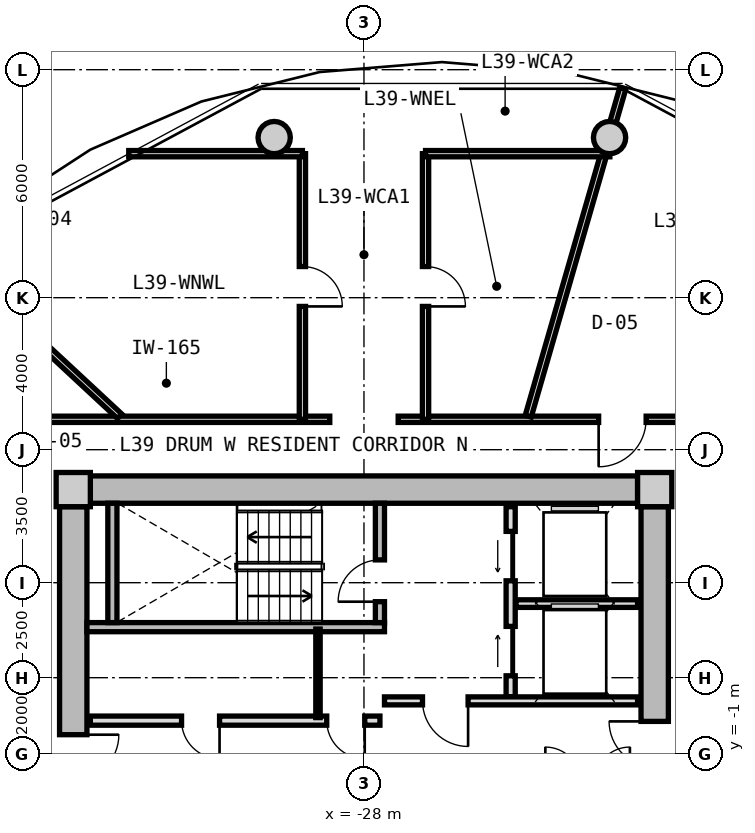
"""IFC4 building model, lengths in metres.
Left out: names, types, materials, properties, quantities, classifications, styles, units other than length and angle.
Written with IfcOpenShell. Run it as: python <this file> out.ifc"""

import sys

from ifc_helpers import new_model, si_unit, direction, frame, frame_2d, origin, origin_2d, place, context, subcontext, project, spatial, rectangle, circle, extrude, source, transform, mapped, element, fill, save


model = new_model("IFC4")
c1 = context("Model", 3, precision=1e-05, world=origin(), true_north=direction((0.0, 1.0)))
c2 = subcontext(c1, "Body", "Model", "MODEL_VIEW")
j1 = project(units=[si_unit("LENGTHUNIT", "METRE"), si_unit("PLANEANGLEUNIT", "RADIAN")], contexts=[c1])
p1 = place(None, origin())
s1 = spatial("IfcSite", under=j1, at=p1, CompositionType="ELEMENT")
p2 = place(p1, origin())
s2 = spatial("IfcBuilding", under=s1, at=p2, CompositionType="ELEMENT")
p3 = place(p2, frame((0.0, 0.0, 126.75)))
s3 = spatial("IfcBuildingStorey", under=s2, at=p3, CompositionType="ELEMENT", Elevation=126.75)
m1 = source(origin(), c2, "Body", "SweptSolid", [
    extrude(rectangle(XDim=0.9, YDim=0.9, at=origin_2d()), origin(), (0.0, 0.0, 1.0), 3.05),
])
for number, where, z_axis, x_axis in (
    (1, (-20.35, 5.95, 0.0), (0.0, 0.0, 1.0), (1.0, 0.0, 0.0)),
    (2, (-35.65, 5.95, 0.0), (0.0, 0.0, 1.0), (1.0, 0.0, 0.0)),
):
    element("IfcColumn", number, at=place(p3, frame(where, z_axis=z_axis, x_axis=x_axis)), inside=s3, PredefinedType="COLUMN", context=c2, shape_type="MappedRepresentation", body=[
        mapped(m1, transform((0.0, 0.0, 0.0), x_axis=(1.0, 0.0, 0.0), y_axis=(0.0, 1.0, 0.0), z_axis=(0.0, 0.0, 1.0), scale=1.0)),
    ])
m2 = source(origin(), c2, "Body", "SweptSolid", [
    extrude(rectangle(XDim=14.4, YDim=0.72, at=frame_2d((7.2, 0.0))), origin(), (0.0, 0.0, 1.0), 2.73),
])
p4 = place(p3, frame((-35.2, 5.95, 0.0), z_axis=(0.0, 0.0, 1.0), x_axis=(1.0, 0.0, 0.0)))
e3 = element("IfcWall", 3, at=p4, inside=s3, PredefinedType="SHEAR", context=c2, shape_type="MappedRepresentation", body=[
    mapped(m2, transform((0.0, 0.0, 0.0), x_axis=(1.0, 0.0, 0.0), y_axis=(0.0, 1.0, 0.0), z_axis=(0.0, 0.0, 1.0), scale=1.0)),
])
m3 = source(origin(), c2, "Body", "SweptSolid", [
    extrude(rectangle(XDim=11.0, YDim=0.72, at=frame_2d((5.5, 0.0))), origin(), (0.0, 0.0, 1.0), 2.73),
])
p5 = place(p3, frame((-35.65, -5.5, 0.0), z_axis=(0.0, 0.0, 1.0), x_axis=(0.0, 1.0, 0.0)))
e4 = element("IfcWall", 4, at=p5, inside=s3, PredefinedType="SHEAR", context=c2, shape_type="MappedRepresentation", body=[
    mapped(m3, transform((0.0, 0.0, 0.0), x_axis=(1.0, 0.0, 0.0), y_axis=(0.0, 1.0, 0.0), z_axis=(0.0, 0.0, 1.0), scale=1.0)),
])
p6 = place(p5, frame((3.8, 0.0, 0.0)))
e5 = element("IfcOpeningElement", 5, at=p6, cuts=e4, PredefinedType="OPENING", context=c2, shape_type="SweptSolid", body=[
    extrude(rectangle(XDim=1.2, YDim=2.15, at=frame_2d((0.6, 1.075))), frame((0.0, 0.37, 0.0), z_axis=(0.0, -1.0, 0.0), x_axis=(1.0, 0.0, 0.0)), (0.0, 0.0, 1.0), 0.74),
])
p7 = place(p3, frame((-20.35, 5.5, 0.0), z_axis=(0.0, 0.0, 1.0), x_axis=(0.0, -1.0, 0.0)))
e6 = element("IfcWall", 6, at=p7, inside=s3, PredefinedType="SHEAR", context=c2, shape_type="MappedRepresentation", body=[
    mapped(m3, transform((0.0, 0.0, 0.0), x_axis=(1.0, 0.0, 0.0), y_axis=(0.0, 1.0, 0.0), z_axis=(0.0, 0.0, 1.0), scale=1.0)),
])
p8 = place(p7, frame((5.65, 0.0, 0.0)))
e7 = element("IfcOpeningElement", 7, at=p8, cuts=e6, PredefinedType="OPENING", context=c2, shape_type="SweptSolid", body=[
    extrude(rectangle(XDim=1.2, YDim=2.15, at=frame_2d((0.6, 1.075))), frame((0.0, 0.37, 0.0), z_axis=(0.0, -1.0, 0.0), x_axis=(1.0, 0.0, 0.0)), (0.0, 0.0, 1.0), 0.74),
])
m4 = source(origin(), c2, "Body", "SweptSolid", [
    extrude(circle(Radius=0.425, at=origin_2d()), origin(), (0.0, 0.0, 1.0), 3.05),
])
for number, where, z_axis, x_axis in (
    (8, (-21.537, 15.213, 0.0), (0.0, 0.0, 1.0), (1.0, 0.0, 0.0)),
    (9, (-30.363, 15.213, 0.0), (0.0, 0.0, 1.0), (1.0, 0.0, 0.0)),
):
    element("IfcColumn", number, at=place(p3, frame(where, z_axis=z_axis, x_axis=x_axis)), inside=s3, PredefinedType="COLUMN", context=c2, shape_type="MappedRepresentation", body=[
        mapped(m4, transform((0.0, 0.0, 0.0), x_axis=(1.0, 0.0, 0.0), y_axis=(0.0, 1.0, 0.0), z_axis=(0.0, 0.0, 1.0), scale=1.0)),
    ])
m5 = source(origin(), c2, "Body", "SweptSolid", [
    extrude(rectangle(XDim=7.83, YDim=0.24, at=frame_2d((3.915, 0.0))), origin(), (0.0, 0.0, 1.0), 2.73),
])
p9 = place(p3, frame((-35.29, 2.33, 0.0), z_axis=(0.0, 0.0, 1.0), x_axis=(1.0, 0.0, 0.0)))
e10 = element("IfcWall", 10, at=p9, inside=s3, PredefinedType="PARTITIONING", context=c2, shape_type="MappedRepresentation", body=[
    mapped(m5, transform((0.0, 0.0, 0.0), x_axis=(1.0, 0.0, 0.0), y_axis=(0.0, 1.0, 0.0), z_axis=(0.0, 0.0, 1.0), scale=1.0)),
])
m6 = source(origin(), c2, "Body", "SweptSolid", [
    extrude(rectangle(XDim=3.14, YDim=0.24, at=frame_2d((1.57, 0.0))), origin(), (0.0, 0.0, 1.0), 2.73),
])
p10 = place(p3, frame((-34.62, 2.45, 0.0), z_axis=(0.0, 0.0, 1.0), x_axis=(0.0, 1.0, 0.0)))
e11 = element("IfcWall", 11, at=p10, inside=s3, PredefinedType="PARTITIONING", context=c2, shape_type="MappedRepresentation", body=[
    mapped(m6, transform((0.0, 0.0, 0.0), x_axis=(1.0, 0.0, 0.0), y_axis=(0.0, 1.0, 0.0), z_axis=(0.0, 0.0, 1.0), scale=1.0)),
])
p11 = place(p3, frame((-27.58, 2.45, 0.0), z_axis=(0.0, 0.0, 1.0), x_axis=(0.0, 1.0, 0.0)))
e12 = element("IfcWall", 12, at=p11, inside=s3, PredefinedType="PARTITIONING", context=c2, shape_type="MappedRepresentation", body=[
    mapped(m6, transform((0.0, 0.0, 0.0), x_axis=(1.0, 0.0, 0.0), y_axis=(0.0, 1.0, 0.0), z_axis=(0.0, 0.0, 1.0), scale=1.0)),
])
p12 = place(p11, frame((0.55, 0.0, 0.0)))
e13 = element("IfcOpeningElement", 13, at=p12, cuts=e12, PredefinedType="OPENING", context=c2, shape_type="SweptSolid", body=[
    extrude(rectangle(XDim=1.1, YDim=2.15, at=frame_2d((0.55, 1.075))), frame((0.0, 0.13, 0.0), z_axis=(0.0, -1.0, 0.0), x_axis=(1.0, 0.0, 0.0)), (0.0, 0.0, 1.0), 0.26),
])
m7 = source(origin(), c2, "Body", "SweptSolid", [
    extrude(rectangle(XDim=5.0, YDim=0.24, at=frame_2d((2.5, 0.0))), origin(), (0.0, 0.0, 1.0), 2.715),
])
p13 = place(p3, frame((-24.14, 0.5, 0.0), z_axis=(0.0, 0.0, 1.0), x_axis=(0.0, 1.0, 0.0)))
e14 = element("IfcWall", 14, at=p13, inside=s3, PredefinedType="PARTITIONING", context=c2, shape_type="MappedRepresentation", body=[
    mapped(m7, transform((0.0, 0.0, 0.0), x_axis=(1.0, 0.0, 0.0), y_axis=(0.0, 1.0, 0.0), z_axis=(0.0, 0.0, 1.0), scale=1.0)),
])
p14 = place(p13, frame((3.05, 0.0, 0.0)))
e15 = element("IfcOpeningElement", 15, at=p14, cuts=e14, PredefinedType="OPENING", context=c2, shape_type="SweptSolid", body=[
    extrude(rectangle(XDim=1.3, YDim=2.2, at=frame_2d((0.65, 1.1))), frame((0.0, 0.13, 0.0), z_axis=(0.0, -1.0, 0.0), x_axis=(1.0, 0.0, 0.0)), (0.0, 0.0, 1.0), 0.26),
])
p15 = place(p13, frame((0.55, 0.0, 0.0)))
e16 = element("IfcOpeningElement", 16, at=p15, cuts=e14, PredefinedType="OPENING", context=c2, shape_type="SweptSolid", body=[
    extrude(rectangle(XDim=1.3, YDim=2.2, at=frame_2d((0.65, 1.1))), frame((0.0, 0.13, 0.0), z_axis=(0.0, -1.0, 0.0), x_axis=(1.0, 0.0, 0.0)), (0.0, 0.0, 1.0), 0.26),
])
m8 = source(origin(), c2, "Body", "SweptSolid", [
    extrude(rectangle(XDim=3.2, YDim=0.2, at=frame_2d((1.6, 0.0))), origin(), (0.0, 0.0, 1.0), 2.715),
])
p16 = place(p3, frame((-24.0, 2.95, 0.0), z_axis=(0.0, 0.0, 1.0), x_axis=(1.0, 0.0, 0.0)))
e17 = element("IfcWall", 17, at=p16, inside=s3, PredefinedType="PARTITIONING", context=c2, shape_type="MappedRepresentation", body=[
    mapped(m8, transform((0.0, 0.0, 0.0), x_axis=(1.0, 0.0, 0.0), y_axis=(0.0, 1.0, 0.0), z_axis=(0.0, 0.0, 1.0), scale=1.0)),
])
m9 = source(origin(), c2, "Body", "SweptSolid", [
    extrude(rectangle(XDim=6.66, YDim=0.21, at=frame_2d((3.33, 0.0))), origin(), (0.0, 0.0, 1.0), 2.715),
])
p17 = place(p3, frame((-27.46, 0.39, 0.0), z_axis=(0.0, 0.0, 1.0), x_axis=(1.0, 0.0, 0.0)))
e18 = element("IfcWall", 18, at=p17, inside=s3, PredefinedType="PARTITIONING", context=c2, shape_type="MappedRepresentation", body=[
    mapped(m9, transform((0.0, 0.0, 0.0), x_axis=(1.0, 0.0, 0.0), y_axis=(0.0, 1.0, 0.0), z_axis=(0.0, 0.0, 1.0), scale=1.0)),
])
p18 = place(p17, frame((1.0, 0.0, 0.0)))
e19 = element("IfcOpeningElement", 19, at=p18, cuts=e18, PredefinedType="OPENING", context=c2, shape_type="SweptSolid", body=[
    extrude(rectangle(XDim=1.2, YDim=2.15, at=frame_2d((0.6, 1.075))), frame((0.0, 0.115, 0.0), z_axis=(0.0, -1.0, 0.0), x_axis=(1.0, 0.0, 0.0)), (0.0, 0.0, 1.0), 0.23),
])
m10 = source(origin(), c2, "Body", "SweptSolid", [
    extrude(rectangle(XDim=7.62, YDim=0.24, at=frame_2d((3.81, 0.0))), origin(), (0.0, 0.0, 1.0), 2.715),
])
p19 = place(p3, frame((-35.2, -0.13, 0.0), z_axis=(0.0, 0.0, 1.0), x_axis=(1.0, 0.0, 0.0)))
e20 = element("IfcWall", 20, at=p19, inside=s3, PredefinedType="PARTITIONING", context=c2, shape_type="MappedRepresentation", body=[
    mapped(m10, transform((0.0, 0.0, 0.0), x_axis=(1.0, 0.0, 0.0), y_axis=(0.0, 1.0, 0.0), z_axis=(0.0, 0.0, 1.0), scale=1.0)),
])
p20 = place(p19, frame((6.22, 0.0, 0.0)))
e21 = element("IfcOpeningElement", 21, at=p20, cuts=e20, PredefinedType="OPENING", context=c2, shape_type="SweptSolid", body=[
    extrude(rectangle(XDim=1.0, YDim=2.1, at=frame_2d((0.5, 1.05))), frame((0.0, 0.13, 0.0), z_axis=(0.0, -1.0, 0.0), x_axis=(1.0, 0.0, 0.0)), (0.0, 0.0, 1.0), 0.26),
])
p21 = place(p19, frame((2.4, 0.0, 0.0)))
e22 = element("IfcOpeningElement", 22, at=p21, cuts=e20, PredefinedType="OPENING", context=c2, shape_type="SweptSolid", body=[
    extrude(rectangle(XDim=1.0, YDim=2.1, at=frame_2d((0.5, 1.05))), frame((0.0, 0.13, 0.0), z_axis=(0.0, -1.0, 0.0), x_axis=(1.0, 0.0, 0.0)), (0.0, 0.0, 1.0), 0.26),
])
m11 = source(origin(), c2, "Body", "SweptSolid", [
    extrude(rectangle(XDim=2.33, YDim=0.115, at=frame_2d((1.165, 0.0))), origin(), (0.0, 0.0, 1.0), 2.715),
])
p22 = place(p3, frame((-29.21, -0.05, 0.0), z_axis=(0.0, 0.0, 1.0), x_axis=(0.0, 1.0, 0.0)))
e23 = element("IfcWall", 23, at=p22, inside=s3, PredefinedType="PARTITIONING", context=c2, shape_type="MappedRepresentation", body=[
    mapped(m11, transform((0.0, 0.0, 0.0), x_axis=(1.0, 0.0, 0.0), y_axis=(0.0, 1.0, 0.0), z_axis=(0.0, 0.0, 1.0), scale=1.0)),
])
m12 = source(origin(), c2, "Body", "SweptSolid", [
    extrude(rectangle(XDim=8.6, YDim=0.165, at=frame_2d((4.3, 0.0))), origin(), (0.0, 0.0, 1.0), 2.715),
])
p23 = place(p3, frame((-37.5, 7.8, 0.0), z_axis=(0.0, 0.0, 1.0), x_axis=(1.0, 0.0, 0.0)))
e24 = element("IfcWall", 24, at=p23, inside=s3, PredefinedType="PARTITIONING", context=c2, shape_type="MappedRepresentation", body=[
    mapped(m12, transform((0.0, 0.0, 0.0), x_axis=(1.0, 0.0, 0.0), y_axis=(0.0, 1.0, 0.0), z_axis=(0.0, 0.0, 1.0), scale=1.0)),
])
p24 = place(p3, frame((-27.1, 7.8, 0.0), z_axis=(0.0, 0.0, 1.0), x_axis=(1.0, 0.0, 0.0)))
e25 = element("IfcWall", 25, at=p24, inside=s3, PredefinedType="PARTITIONING", context=c2, shape_type="MappedRepresentation", body=[
    mapped(m12, transform((0.0, 0.0, 0.0), x_axis=(1.0, 0.0, 0.0), y_axis=(0.0, 1.0, 0.0), z_axis=(0.0, 0.0, 1.0), scale=1.0)),
])
p25 = place(p24, frame((5.275, 0.0, 0.0)))
e26 = element("IfcOpeningElement", 26, at=p25, cuts=e25, PredefinedType="OPENING", context=c2, shape_type="SweptSolid", body=[
    extrude(rectangle(XDim=1.25, YDim=2.2, at=frame_2d((0.625, 1.1))), frame((0.0, 0.093, 0.0), z_axis=(0.0, -1.0, 0.0), x_axis=(1.0, 0.0, 0.0)), (0.0, 0.0, 1.0), 0.185),
])
m13 = source(origin(), c2, "Body", "SweptSolid", [
    extrude(rectangle(XDim=8.989, YDim=0.165, at=frame_2d((4.495, 0.0))), origin(), (0.0, 0.0, 1.0), 2.215),
])
p26 = place(p3, frame((-23.678, 7.88, 0.0), z_axis=(0.0, 0.0, 1.0), x_axis=(0.27702323008, 0.960863221274, 0.0)))
e27 = element("IfcWall", 27, at=p26, inside=s3, PredefinedType="PARTITIONING", context=c2, shape_type="MappedRepresentation", body=[
    mapped(m13, transform((0.0, 0.0, 0.0), x_axis=(1.0, 0.0, 0.0), y_axis=(0.0, 1.0, 0.0), z_axis=(0.0, 0.0, 1.0), scale=1.0)),
])
m14 = source(origin(), c2, "Body", "SweptSolid", [
    extrude(rectangle(XDim=6.187, YDim=0.165, at=frame_2d((3.093, 0.0))), origin(), (0.0, 0.0, 1.0), 2.215),
])
p27 = place(p3, frame((-34.429, 7.88, 0.0), z_axis=(0.0, 0.0, 1.0), x_axis=(-0.732501077882, 0.680765870841, 0.0)))
e28 = element("IfcWall", 28, at=p27, inside=s3, PredefinedType="PARTITIONING", context=c2, shape_type="MappedRepresentation", body=[
    mapped(m14, transform((0.0, 0.0, 0.0), x_axis=(1.0, 0.0, 0.0), y_axis=(0.0, 1.0, 0.0), z_axis=(0.0, 0.0, 1.0), scale=1.0)),
])
m15 = source(origin(), c2, "Body", "SweptSolid", [
    extrude(rectangle(XDim=6.99, YDim=0.165, at=frame_2d((3.495, 0.0))), origin(), (0.0, 0.0, 1.0), 2.215),
])
p28 = place(p3, frame((-29.62, 7.8, 0.0), z_axis=(0.0, 0.0, 1.0), x_axis=(0.0, 1.0, 0.0)))
e29 = element("IfcWall", 29, at=p28, inside=s3, PredefinedType="PARTITIONING", context=c2, shape_type="MappedRepresentation", body=[
    mapped(m15, transform((0.0, 0.0, 0.0), x_axis=(1.0, 0.0, 0.0), y_axis=(0.0, 1.0, 0.0), z_axis=(0.0, 0.0, 1.0), scale=1.0)),
])
p29 = place(p28, frame((2.97, 0.0, 0.0)))
e30 = element("IfcOpeningElement", 30, at=p29, cuts=e29, PredefinedType="OPENING", context=c2, shape_type="SweptSolid", body=[
    extrude(rectangle(XDim=1.05, YDim=2.15, at=frame_2d((0.525, 1.075))), frame((0.0, 0.093, 0.0), z_axis=(0.0, -1.0, 0.0), x_axis=(1.0, 0.0, 0.0)), (0.0, 0.0, 1.0), 0.185),
])
m16 = source(origin(), c2, "Body", "SweptSolid", [
    extrude(rectangle(XDim=4.569, YDim=0.165, at=frame_2d((2.285, 0.0))), origin(), (0.0, 0.0, 1.0), 2.715),
])
p30 = place(p3, frame((-34.189, 14.79, 0.0), z_axis=(0.0, 0.0, 1.0), x_axis=(1.0, 0.0, 0.0)))
e31 = element("IfcWall", 31, at=p30, inside=s3, PredefinedType="PARTITIONING", context=c2, shape_type="MappedRepresentation", body=[
    mapped(m16, transform((0.0, 0.0, 0.0), x_axis=(1.0, 0.0, 0.0), y_axis=(0.0, 1.0, 0.0), z_axis=(0.0, 0.0, 1.0), scale=1.0)),
])
m17 = source(origin(), c2, "Body", "SweptSolid", [
    extrude(rectangle(XDim=6.99, YDim=0.165, at=frame_2d((3.495, 0.0))), origin(), (0.0, 0.0, 1.0), 2.715),
])
p31 = place(p3, frame((-26.38, 7.8, 0.0), z_axis=(0.0, 0.0, 1.0), x_axis=(0.0, 1.0, 0.0)))
e32 = element("IfcWall", 32, at=p31, inside=s3, PredefinedType="PARTITIONING", context=c2, shape_type="MappedRepresentation", body=[
    mapped(m17, transform((0.0, 0.0, 0.0), x_axis=(1.0, 0.0, 0.0), y_axis=(0.0, 1.0, 0.0), z_axis=(0.0, 0.0, 1.0), scale=1.0)),
])
p32 = place(p31, frame((2.97, 0.0, 0.0)))
e33 = element("IfcOpeningElement", 33, at=p32, cuts=e32, PredefinedType="OPENING", context=c2, shape_type="SweptSolid", body=[
    extrude(rectangle(XDim=1.05, YDim=2.15, at=frame_2d((0.525, 1.075))), frame((0.0, 0.093, 0.0), z_axis=(0.0, -1.0, 0.0), x_axis=(1.0, 0.0, 0.0)), (0.0, 0.0, 1.0), 0.185),
])
m18 = source(origin(), c2, "Body", "SweptSolid", [
    extrude(rectangle(XDim=4.851, YDim=0.165, at=frame_2d((2.425, 0.0))), origin(), (0.0, 0.0, 1.0), 2.715),
])
p33 = place(p3, frame((-26.38, 14.79, 0.0), z_axis=(0.0, 0.0, 1.0), x_axis=(1.0, 0.0, 0.0)))
e34 = element("IfcWall", 34, at=p33, inside=s3, PredefinedType="PARTITIONING", context=c2, shape_type="MappedRepresentation", body=[
    mapped(m18, transform((0.0, 0.0, 0.0), x_axis=(1.0, 0.0, 0.0), y_axis=(0.0, 1.0, 0.0), z_axis=(0.0, 0.0, 1.0), scale=1.0)),
])
m19 = source(origin(), c2, "Body", "SweptSolid", [
    extrude(rectangle(XDim=1.1, YDim=2.15, at=frame_2d((0.55, 1.075))), frame((0.0, 0.025, 0.0), z_axis=(0.0, -1.0, 0.0), x_axis=(1.0, 0.0, 0.0)), (0.0, 0.0, 1.0), 0.05),
])
p34 = place(p12, origin())
e35 = element("IfcDoor", 35, at=p34, inside=s3, OperationType="SINGLE_SWING_LEFT", PredefinedType="DOOR", context=c2, shape_type="MappedRepresentation", body=[
    mapped(m19, transform((0.0, 0.0, 0.0), x_axis=(1.0, 0.0, 0.0), y_axis=(0.0, 1.0, 0.0), z_axis=(0.0, 0.0, 1.0), scale=1.0)),
])
fill(e13, e35)
m20 = source(origin(), c2, "Body", "SweptSolid", [
    extrude(rectangle(XDim=1.3, YDim=2.2, at=frame_2d((0.65, 1.1))), frame((0.0, 0.025, 0.0), z_axis=(0.0, -1.0, 0.0), x_axis=(1.0, 0.0, 0.0)), (0.0, 0.0, 1.0), 0.05),
])
p35 = place(p14, origin())
e36 = element("IfcDoor", 36, at=p35, inside=s3, OperationType="SLIDING_TO_LEFT", PredefinedType="DOOR", context=c2, shape_type="MappedRepresentation", body=[
    mapped(m20, transform((0.0, 0.0, 0.0), x_axis=(1.0, 0.0, 0.0), y_axis=(0.0, 1.0, 0.0), z_axis=(0.0, 0.0, 1.0), scale=1.0)),
])
fill(e15, e36)
p36 = place(p15, origin())
e37 = element("IfcDoor", 37, at=p36, inside=s3, OperationType="SLIDING_TO_RIGHT", PredefinedType="DOOR", context=c2, shape_type="MappedRepresentation", body=[
    mapped(m20, transform((0.0, 0.0, 0.0), x_axis=(1.0, 0.0, 0.0), y_axis=(0.0, 1.0, 0.0), z_axis=(0.0, 0.0, 1.0), scale=1.0)),
])
fill(e16, e37)
m21 = source(origin(), c2, "Body", "SweptSolid", [
    extrude(rectangle(XDim=1.2, YDim=2.15, at=frame_2d((0.6, 1.075))), frame((0.0, 0.025, 0.0), z_axis=(0.0, -1.0, 0.0), x_axis=(1.0, 0.0, 0.0)), (0.0, 0.0, 1.0), 0.05),
])
p37 = place(p18, frame((1.2, 0.0, 0.0), z_axis=(0.0, 0.0, 1.0), x_axis=(-1.0, 0.0, 0.0)))
e38 = element("IfcDoor", 38, at=p37, inside=s3, OperationType="SINGLE_SWING_LEFT", PredefinedType="DOOR", context=c2, shape_type="MappedRepresentation", body=[
    mapped(m21, transform((0.0, 0.0, 0.0), x_axis=(1.0, 0.0, 0.0), y_axis=(0.0, 1.0, 0.0), z_axis=(0.0, 0.0, 1.0), scale=1.0)),
])
fill(e19, e38)
p38 = place(p6, frame((1.2, 0.0, 0.0), z_axis=(0.0, 0.0, 1.0), x_axis=(-1.0, 0.0, 0.0)))
e39 = element("IfcDoor", 39, at=p38, inside=s3, OperationType="SINGLE_SWING_LEFT", PredefinedType="DOOR", context=c2, shape_type="MappedRepresentation", body=[
    mapped(m21, transform((0.0, 0.0, 0.0), x_axis=(1.0, 0.0, 0.0), y_axis=(0.0, 1.0, 0.0), z_axis=(0.0, 0.0, 1.0), scale=1.0)),
])
fill(e5, e39)
p39 = place(p8, frame((1.2, 0.0, 0.0), z_axis=(0.0, 0.0, 1.0), x_axis=(-1.0, 0.0, 0.0)))
e40 = element("IfcDoor", 40, at=p39, inside=s3, OperationType="SINGLE_SWING_RIGHT", PredefinedType="DOOR", context=c2, shape_type="MappedRepresentation", body=[
    mapped(m21, transform((0.0, 0.0, 0.0), x_axis=(1.0, 0.0, 0.0), y_axis=(0.0, 1.0, 0.0), z_axis=(0.0, 0.0, 1.0), scale=1.0)),
])
fill(e7, e40)
m22 = source(origin(), c2, "Body", "SweptSolid", [
    extrude(rectangle(XDim=1.0, YDim=2.1, at=frame_2d((0.5, 1.05))), frame((0.0, 0.025, 0.0), z_axis=(0.0, -1.0, 0.0), x_axis=(1.0, 0.0, 0.0)), (0.0, 0.0, 1.0), 0.05),
])
p40 = place(p20, frame((1.0, 0.0, 0.0), z_axis=(0.0, 0.0, 1.0), x_axis=(-1.0, 0.0, 0.0)))
e41 = element("IfcDoor", 41, at=p40, inside=s3, OperationType="SINGLE_SWING_LEFT", PredefinedType="DOOR", context=c2, shape_type="MappedRepresentation", body=[
    mapped(m22, transform((0.0, 0.0, 0.0), x_axis=(1.0, 0.0, 0.0), y_axis=(0.0, 1.0, 0.0), z_axis=(0.0, 0.0, 1.0), scale=1.0)),
])
fill(e21, e41)
p41 = place(p21, frame((1.0, 0.0, 0.0), z_axis=(0.0, 0.0, 1.0), x_axis=(-1.0, 0.0, 0.0)))
e42 = element("IfcDoor", 42, at=p41, inside=s3, OperationType="SINGLE_SWING_LEFT", PredefinedType="DOOR", context=c2, shape_type="MappedRepresentation", body=[
    mapped(m22, transform((0.0, 0.0, 0.0), x_axis=(1.0, 0.0, 0.0), y_axis=(0.0, 1.0, 0.0), z_axis=(0.0, 0.0, 1.0), scale=1.0)),
])
fill(e22, e42)
m23 = source(origin(), c2, "Body", "SweptSolid", [
    extrude(rectangle(XDim=1.05, YDim=2.15, at=frame_2d((0.525, 1.075))), frame((0.0, 0.025, 0.0), z_axis=(0.0, -1.0, 0.0), x_axis=(1.0, 0.0, 0.0)), (0.0, 0.0, 1.0), 0.05),
])
p42 = place(p29, frame((1.05, 0.0, 0.0), z_axis=(0.0, 0.0, 1.0), x_axis=(-1.0, 0.0, 0.0)))
e43 = element("IfcDoor", 43, at=p42, inside=s3, OperationType="SINGLE_SWING_RIGHT", PredefinedType="DOOR", context=c2, shape_type="MappedRepresentation", body=[
    mapped(m23, transform((0.0, 0.0, 0.0), x_axis=(1.0, 0.0, 0.0), y_axis=(0.0, 1.0, 0.0), z_axis=(0.0, 0.0, 1.0), scale=1.0)),
])
fill(e30, e43)
p43 = place(p32, frame((1.05, 0.0, 0.0), z_axis=(0.0, 0.0, 1.0), x_axis=(-1.0, 0.0, 0.0)))
e44 = element("IfcDoor", 44, at=p43, inside=s3, OperationType="SINGLE_SWING_RIGHT", PredefinedType="DOOR", context=c2, shape_type="MappedRepresentation", body=[
    mapped(m23, transform((0.0, 0.0, 0.0), x_axis=(1.0, 0.0, 0.0), y_axis=(0.0, 1.0, 0.0), z_axis=(0.0, 0.0, 1.0), scale=1.0)),
])
fill(e33, e44)
m24 = source(origin(), c2, "Body", "SweptSolid", [
    extrude(rectangle(XDim=1.25, YDim=2.2, at=frame_2d((0.625, 1.1))), frame((0.0, 0.025, 0.0), z_axis=(0.0, -1.0, 0.0), x_axis=(1.0, 0.0, 0.0)), (0.0, 0.0, 1.0), 0.05),
])
p44 = place(p25, frame((1.25, 0.0, 0.0), z_axis=(0.0, 0.0, 1.0), x_axis=(-1.0, 0.0, 0.0)))
e45 = element("IfcDoor", 45, at=p44, inside=s3, OperationType="SINGLE_SWING_RIGHT", PredefinedType="DOOR", context=c2, shape_type="MappedRepresentation", body=[
    mapped(m24, transform((0.0, 0.0, 0.0), x_axis=(1.0, 0.0, 0.0), y_axis=(0.0, 1.0, 0.0), z_axis=(0.0, 0.0, 1.0), scale=1.0)),
])
fill(e26, e45)
save(model, sys.argv[1])
